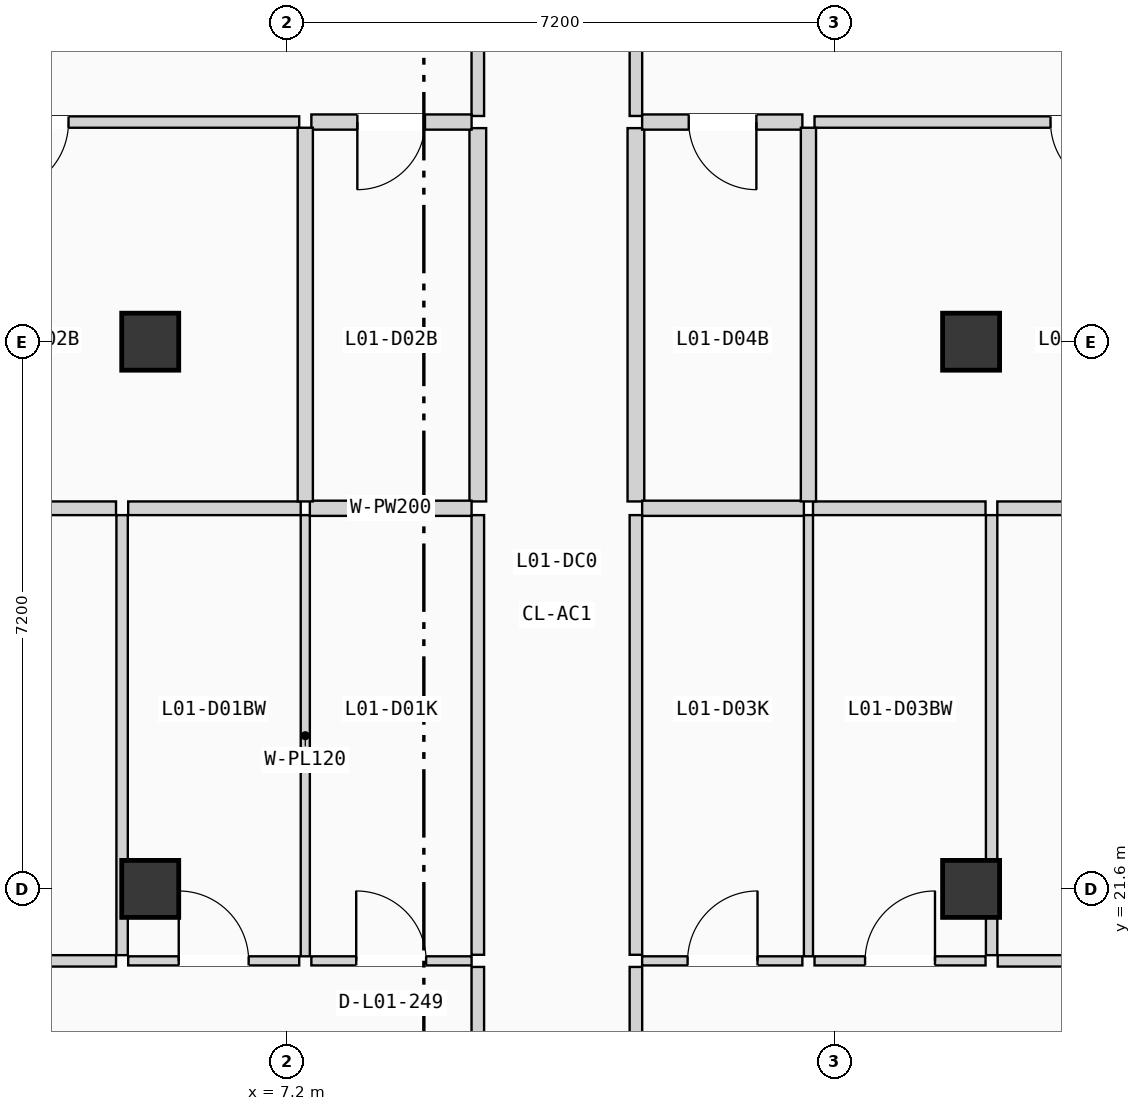
"""IFC4 building model, lengths in metres.
Left out: names, types, materials, properties, quantities, classifications, styles, units other than length and angle.
Written with IfcOpenShell. Run it as: python <this file> out.ifc"""

import sys

from ifc_helpers import new_model, si_unit, direction, frame, frame_2d, origin, origin_2d, place, context, subcontext, project, spatial, rectangle, extrude, element, fill, save


model = new_model("IFC4")
c1 = context("Model", 3, precision=1e-05, world=origin(), true_north=direction((0.0, 1.0)))
c2 = subcontext(c1, "Body", "Model", "MODEL_VIEW")
j1 = project(units=[si_unit("LENGTHUNIT", "METRE"), si_unit("PLANEANGLEUNIT", "RADIAN")], contexts=[c1])
p1 = place(None, origin())
s1 = spatial("IfcSite", under=j1, at=p1, CompositionType="ELEMENT")
p2 = place(p1, origin())
s2 = spatial("IfcBuilding", under=s1, at=p2, CompositionType="ELEMENT")
p3 = place(p2, frame((0.0, 0.0, 4.9)))
s3 = spatial("IfcBuildingStorey", under=s2, at=p3, CompositionType="ELEMENT", Elevation=4.9)
for number, where, z_axis, x_axis in (
    (1, (5.4, 21.6, 0.0), (0.0, 0.0, 1.0), (1.0, 0.0, 0.0)),
    (2, (5.4, 28.8, 0.0), (0.0, 0.0, 1.0), (1.0, 0.0, 0.0)),
    (3, (16.2, 21.6, 0.0), (0.0, 0.0, 1.0), (1.0, 0.0, 0.0)),
    (4, (16.2, 28.8, 0.0), (0.0, 0.0, 1.0), (1.0, 0.0, 0.0)),
):
    element("IfcColumn", number, at=place(p3, frame(where, z_axis=z_axis, x_axis=x_axis)), inside=s3, PredefinedType="COLUMN", context=c2, shape_type="SweptSolid", body=[
        extrude(rectangle(XDim=0.75, YDim=0.75, at=origin_2d()), origin(), (0.0, 0.0, 1.0), 3.675),
    ])
p4 = place(p3, frame((9.71, 13.545, 0.0), z_axis=(0.0, 0.0, 1.0), x_axis=(0.0, 1.0, 0.0)))
e5 = element("IfcWall", 5, at=p4, inside=s3, PredefinedType="PARTITIONING", context=c2, shape_type="SweptSolid", body=[
    extrude(rectangle(XDim=7.028, YDim=0.165, at=frame_2d((3.514, 0.0))), origin(), (0.0, 0.0, 1.0), 3.395),
])
p5 = place(p4, frame((3.009, 0.0, 0.0)))
e6 = element("IfcOpeningElement", 6, at=p5, cuts=e5, PredefinedType="OPENING", context=c2, shape_type="SweptSolid", body=[
    extrude(rectangle(XDim=1.01, YDim=2.11, at=frame_2d((0.505, 1.055))), frame((0.0, 0.093, 0.0), z_axis=(0.0, -1.0, 0.0), x_axis=(1.0, 0.0, 0.0)), (0.0, 0.0, 1.0), 0.185),
])
p6 = place(p3, frame((9.71, 20.733, 0.0), z_axis=(0.0, 0.0, 1.0), x_axis=(0.0, 1.0, 0.0)))
e7 = element("IfcWall", 7, at=p6, inside=s3, PredefinedType="PARTITIONING", context=c2, shape_type="SweptSolid", body=[
    extrude(rectangle(XDim=5.785, YDim=0.165, at=frame_2d((2.893, 0.0))), origin(), (0.0, 0.0, 1.0), 3.395),
])
p7 = place(p3, frame((9.71, 31.77, 0.0), z_axis=(0.0, 0.0, 1.0), x_axis=(0.0, 1.0, 0.0)))
e8 = element("IfcWall", 8, at=p7, inside=s3, PredefinedType="PARTITIONING", context=c2, shape_type="SweptSolid", body=[
    extrude(rectangle(XDim=5.958, YDim=0.165, at=frame_2d((2.979, 0.0))), origin(), (0.0, 0.0, 1.0), 3.395),
])
p8 = place(p7, frame((2.474, 0.0, 0.0)))
e9 = element("IfcOpeningElement", 9, at=p8, cuts=e8, PredefinedType="OPENING", context=c2, shape_type="SweptSolid", body=[
    extrude(rectangle(XDim=1.01, YDim=2.11, at=frame_2d((0.505, 1.055))), frame((0.0, 0.093, 0.0), z_axis=(0.0, -1.0, 0.0), x_axis=(1.0, 0.0, 0.0)), (0.0, 0.0, 1.0), 0.185),
])
p9 = place(p3, frame((9.71, 26.698, 0.0), z_axis=(0.0, 0.0, 1.0), x_axis=(0.0, 1.0, 0.0)))
e10 = element("IfcWall", 10, at=p9, inside=s3, PredefinedType="PLUMBINGWALL", context=c2, shape_type="SweptSolid", body=[
    extrude(rectangle(XDim=4.912, YDim=0.22, at=frame_2d((2.456, 0.0))), origin(), (0.0, 0.0, 1.0), 3.395),
])
p10 = place(p3, frame((11.79, 13.545, 0.0), z_axis=(0.0, 0.0, 1.0), x_axis=(0.0, 1.0, 0.0)))
e11 = element("IfcWall", 11, at=p10, inside=s3, PredefinedType="PARTITIONING", context=c2, shape_type="SweptSolid", body=[
    extrude(rectangle(XDim=7.028, YDim=0.165, at=frame_2d((3.514, 0.0))), origin(), (0.0, 0.0, 1.0), 3.395),
])
p11 = place(p10, frame((3.009, 0.0, 0.0)))
e12 = element("IfcOpeningElement", 12, at=p11, cuts=e11, PredefinedType="OPENING", context=c2, shape_type="SweptSolid", body=[
    extrude(rectangle(XDim=1.01, YDim=2.11, at=frame_2d((0.505, 1.055))), frame((0.0, 0.093, 0.0), z_axis=(0.0, -1.0, 0.0), x_axis=(1.0, 0.0, 0.0)), (0.0, 0.0, 1.0), 0.185),
])
p12 = place(p3, frame((11.79, 20.733, 0.0), z_axis=(0.0, 0.0, 1.0), x_axis=(0.0, 1.0, 0.0)))
e13 = element("IfcWall", 13, at=p12, inside=s3, PredefinedType="PARTITIONING", context=c2, shape_type="SweptSolid", body=[
    extrude(rectangle(XDim=5.785, YDim=0.165, at=frame_2d((2.893, 0.0))), origin(), (0.0, 0.0, 1.0), 3.395),
])
p13 = place(p3, frame((11.79, 31.77, 0.0), z_axis=(0.0, 0.0, 1.0), x_axis=(0.0, 1.0, 0.0)))
e14 = element("IfcWall", 14, at=p13, inside=s3, PredefinedType="PARTITIONING", context=c2, shape_type="SweptSolid", body=[
    extrude(rectangle(XDim=5.958, YDim=0.165, at=frame_2d((2.979, 0.0))), origin(), (0.0, 0.0, 1.0), 3.395),
])
p14 = place(p13, frame((2.474, 0.0, 0.0)))
e15 = element("IfcOpeningElement", 15, at=p14, cuts=e14, PredefinedType="OPENING", context=c2, shape_type="SweptSolid", body=[
    extrude(rectangle(XDim=1.01, YDim=2.11, at=frame_2d((0.505, 1.055))), frame((0.0, 0.093, 0.0), z_axis=(0.0, -1.0, 0.0), x_axis=(1.0, 0.0, 0.0)), (0.0, 0.0, 1.0), 0.185),
])
p15 = place(p3, frame((11.79, 26.698, 0.0), z_axis=(0.0, 0.0, 1.0), x_axis=(0.0, 1.0, 0.0)))
e16 = element("IfcWall", 16, at=p15, inside=s3, PredefinedType="PLUMBINGWALL", context=c2, shape_type="SweptSolid", body=[
    extrude(rectangle(XDim=4.912, YDim=0.22, at=frame_2d((2.456, 0.0))), origin(), (0.0, 0.0, 1.0), 3.395),
])
p16 = place(p3, frame((7.52, 20.653, 0.0), z_axis=(0.0, 0.0, 1.0), x_axis=(1.0, 0.0, 0.0)))
e17 = element("IfcWall", 17, at=p16, inside=s3, PredefinedType="PARTITIONING", context=c2, shape_type="SweptSolid", body=[
    extrude(rectangle(XDim=2.108, YDim=0.12, at=frame_2d((1.054, 0.0))), origin(), (0.0, 0.0, 1.0), 3.395),
])
p17 = place(p16, frame((0.59, 0.0, 0.0)))
e18 = element("IfcOpeningElement", 18, at=p17, cuts=e17, PredefinedType="OPENING", context=c2, shape_type="SweptSolid", body=[
    extrude(rectangle(XDim=0.92, YDim=2.02, at=frame_2d((0.46, 1.01))), frame((0.0, 0.07, 0.0), z_axis=(0.0, -1.0, 0.0), x_axis=(1.0, 0.0, 0.0)), (0.0, 0.0, 1.0), 0.14),
])
p18 = place(p3, frame((0.35, 20.653, 0.0), z_axis=(0.0, 0.0, 1.0), x_axis=(1.0, 0.0, 0.0)))
e19 = element("IfcWall", 19, at=p18, inside=s3, PredefinedType="PARTITIONING", context=c2, shape_type="SweptSolid", body=[
    extrude(rectangle(XDim=4.6, YDim=0.15, at=frame_2d((2.3, 0.0))), origin(), (0.0, 0.0, 1.0), 3.395),
])
p19 = place(p18, frame((1.76, 0.0, 0.0)))
e20 = element("IfcOpeningElement", 20, at=p19, cuts=e19, PredefinedType="OPENING", context=c2, shape_type="SweptSolid", body=[
    extrude(rectangle(XDim=1.08, YDim=2.1, at=frame_2d((0.54, 1.05))), frame((0.0, 0.085, 0.0), z_axis=(0.0, -1.0, 0.0), x_axis=(1.0, 0.0, 0.0)), (0.0, 0.0, 1.0), 0.17),
])
p20 = place(p3, frame((5.11, 20.653, 0.0), z_axis=(0.0, 0.0, 1.0), x_axis=(1.0, 0.0, 0.0)))
e21 = element("IfcWall", 21, at=p20, inside=s3, PredefinedType="PARTITIONING", context=c2, shape_type="SweptSolid", body=[
    extrude(rectangle(XDim=2.25, YDim=0.12, at=frame_2d((1.125, 0.0))), origin(), (0.0, 0.0, 1.0), 3.395),
])
p21 = place(p20, frame((0.665, 0.0, 0.0)))
e22 = element("IfcOpeningElement", 22, at=p21, cuts=e21, PredefinedType="OPENING", context=c2, shape_type="SweptSolid", body=[
    extrude(rectangle(XDim=0.92, YDim=2.02, at=frame_2d((0.46, 1.01))), frame((0.0, 0.07, 0.0), z_axis=(0.0, -1.0, 0.0), x_axis=(1.0, 0.0, 0.0)), (0.0, 0.0, 1.0), 0.14),
])
p22 = place(p3, frame((7.44, 20.713, 0.0), z_axis=(0.0, 0.0, 1.0), x_axis=(0.0, 1.0, 0.0)))
e23 = element("IfcWall", 23, at=p22, inside=s3, PredefinedType="PARTITIONING", context=c2, shape_type="SweptSolid", body=[
    extrude(rectangle(XDim=5.805, YDim=0.12, at=frame_2d((2.903, 0.0))), origin(), (0.0, 0.0, 1.0), 3.395),
])
p23 = place(p3, frame((7.5, 26.608, 0.0), z_axis=(0.0, 0.0, 1.0), x_axis=(1.0, 0.0, 0.0)))
e24 = element("IfcWall", 24, at=p23, inside=s3, PredefinedType="PLUMBINGWALL", context=c2, shape_type="SweptSolid", body=[
    extrude(rectangle(XDim=2.128, YDim=0.2, at=frame_2d((1.064, 0.0))), origin(), (0.0, 0.0, 1.0), 3.395),
])
p24 = place(p3, frame((5.03, 20.728, 0.0), z_axis=(0.0, 0.0, 1.0), x_axis=(0.0, 1.0, 0.0)))
e25 = element("IfcWall", 25, at=p24, inside=s3, PredefinedType="PARTITIONING", context=c2, shape_type="SweptSolid", body=[
    extrude(rectangle(XDim=5.79, YDim=0.15, at=frame_2d((2.895, 0.0))), origin(), (0.0, 0.0, 1.0), 3.395),
])
p25 = place(p3, frame((0.35, 26.608, 0.0), z_axis=(0.0, 0.0, 1.0), x_axis=(1.0, 0.0, 0.0)))
e26 = element("IfcWall", 26, at=p25, inside=s3, PredefinedType="PARTITIONING", context=c2, shape_type="SweptSolid", body=[
    extrude(rectangle(XDim=4.6, YDim=0.18, at=frame_2d((2.3, 0.0))), origin(), (0.0, 0.0, 1.0), 3.395),
])
p26 = place(p3, frame((5.11, 26.608, 0.0), z_axis=(0.0, 0.0, 1.0), x_axis=(1.0, 0.0, 0.0)))
e27 = element("IfcWall", 27, at=p26, inside=s3, PredefinedType="PARTITIONING", context=c2, shape_type="SweptSolid", body=[
    extrude(rectangle(XDim=2.27, YDim=0.18, at=frame_2d((1.135, 0.0))), origin(), (0.0, 0.0, 1.0), 3.395),
])
p27 = place(p3, frame((7.52, 31.69, 0.0), z_axis=(0.0, 0.0, 1.0), x_axis=(1.0, 0.0, 0.0)))
e28 = element("IfcWall", 28, at=p27, inside=s3, PredefinedType="PLUMBINGWALL", context=c2, shape_type="SweptSolid", body=[
    extrude(rectangle(XDim=2.108, YDim=0.2, at=frame_2d((1.054, 0.0))), origin(), (0.0, 0.0, 1.0), 3.395),
])
p28 = place(p27, frame((0.605, 0.0, 0.0)))
e29 = element("IfcOpeningElement", 29, at=p28, cuts=e28, PredefinedType="OPENING", context=c2, shape_type="SweptSolid", body=[
    extrude(rectangle(XDim=0.89, YDim=2.03, at=frame_2d((0.445, 1.015))), frame((0.0, 0.11, 0.0), z_axis=(0.0, -1.0, 0.0), x_axis=(1.0, 0.0, 0.0)), (0.0, 0.0, 1.0), 0.22),
])
p29 = place(p3, frame((0.35, 31.69, 0.0), z_axis=(0.0, 0.0, 1.0), x_axis=(1.0, 0.0, 0.0)))
e30 = element("IfcWall", 30, at=p29, inside=s3, PredefinedType="PARTITIONING", context=c2, shape_type="SweptSolid", body=[
    extrude(rectangle(XDim=7.01, YDim=0.15, at=frame_2d((3.505, 0.0))), origin(), (0.0, 0.0, 1.0), 3.395),
])
p30 = place(p29, frame((3.035, 0.0, 0.0)))
e31 = element("IfcOpeningElement", 31, at=p30, cuts=e30, PredefinedType="OPENING", context=c2, shape_type="SweptSolid", body=[
    extrude(rectangle(XDim=0.94, YDim=2.06, at=frame_2d((0.47, 1.03))), frame((0.0, 0.085, 0.0), z_axis=(0.0, -1.0, 0.0), x_axis=(1.0, 0.0, 0.0)), (0.0, 0.0, 1.0), 0.17),
])
p31 = place(p3, frame((7.44, 26.698, 0.0), z_axis=(0.0, 0.0, 1.0), x_axis=(0.0, 1.0, 0.0)))
e32 = element("IfcWall", 32, at=p31, inside=s3, PredefinedType="PLUMBINGWALL", context=c2, shape_type="SweptSolid", body=[
    extrude(rectangle(XDim=4.917, YDim=0.2, at=frame_2d((2.458, 0.0))), origin(), (0.0, 0.0, 1.0), 3.395),
])
p32 = place(p3, frame((11.872, 20.653, 0.0), z_axis=(0.0, 0.0, 1.0), x_axis=(1.0, 0.0, 0.0)))
e33 = element("IfcWall", 33, at=p32, inside=s3, PredefinedType="PARTITIONING", context=c2, shape_type="SweptSolid", body=[
    extrude(rectangle(XDim=2.108, YDim=0.12, at=frame_2d((1.054, 0.0))), origin(), (0.0, 0.0, 1.0), 3.395),
])
p33 = place(p32, frame((0.598, 0.0, 0.0)))
e34 = element("IfcOpeningElement", 34, at=p33, cuts=e33, PredefinedType="OPENING", context=c2, shape_type="SweptSolid", body=[
    extrude(rectangle(XDim=0.92, YDim=2.02, at=frame_2d((0.46, 1.01))), frame((0.0, 0.07, 0.0), z_axis=(0.0, -1.0, 0.0), x_axis=(1.0, 0.0, 0.0)), (0.0, 0.0, 1.0), 0.14),
])
p34 = place(p3, frame((16.55, 20.653, 0.0), z_axis=(0.0, 0.0, 1.0), x_axis=(1.0, 0.0, 0.0)))
e35 = element("IfcWall", 35, at=p34, inside=s3, PredefinedType="PARTITIONING", context=c2, shape_type="SweptSolid", body=[
    extrude(rectangle(XDim=4.7, YDim=0.15, at=frame_2d((2.35, 0.0))), origin(), (0.0, 0.0, 1.0), 3.395),
])
p35 = place(p34, frame((1.83, 0.0, 0.0)))
e36 = element("IfcOpeningElement", 36, at=p35, cuts=e35, PredefinedType="OPENING", context=c2, shape_type="SweptSolid", body=[
    extrude(rectangle(XDim=1.04, YDim=2.08, at=frame_2d((0.52, 1.04))), frame((0.0, 0.085, 0.0), z_axis=(0.0, -1.0, 0.0), x_axis=(1.0, 0.0, 0.0)), (0.0, 0.0, 1.0), 0.17),
])
p36 = place(p3, frame((14.14, 20.653, 0.0), z_axis=(0.0, 0.0, 1.0), x_axis=(1.0, 0.0, 0.0)))
e37 = element("IfcWall", 37, at=p36, inside=s3, PredefinedType="PARTITIONING", context=c2, shape_type="SweptSolid", body=[
    extrude(rectangle(XDim=2.25, YDim=0.12, at=frame_2d((1.125, 0.0))), origin(), (0.0, 0.0, 1.0), 3.395),
])
p37 = place(p36, frame((0.665, 0.0, 0.0)))
e38 = element("IfcOpeningElement", 38, at=p37, cuts=e37, PredefinedType="OPENING", context=c2, shape_type="SweptSolid", body=[
    extrude(rectangle(XDim=0.92, YDim=2.02, at=frame_2d((0.46, 1.01))), frame((0.0, 0.07, 0.0), z_axis=(0.0, -1.0, 0.0), x_axis=(1.0, 0.0, 0.0)), (0.0, 0.0, 1.0), 0.14),
])
p38 = place(p3, frame((14.06, 20.713, 0.0), z_axis=(0.0, 0.0, 1.0), x_axis=(0.0, 1.0, 0.0)))
e39 = element("IfcWall", 39, at=p38, inside=s3, PredefinedType="PARTITIONING", context=c2, shape_type="SweptSolid", body=[
    extrude(rectangle(XDim=5.805, YDim=0.12, at=frame_2d((2.903, 0.0))), origin(), (0.0, 0.0, 1.0), 3.395),
])
p39 = place(p3, frame((11.872, 26.608, 0.0), z_axis=(0.0, 0.0, 1.0), x_axis=(1.0, 0.0, 0.0)))
e40 = element("IfcWall", 40, at=p39, inside=s3, PredefinedType="PLUMBINGWALL", context=c2, shape_type="SweptSolid", body=[
    extrude(rectangle(XDim=2.128, YDim=0.2, at=frame_2d((1.064, 0.0))), origin(), (0.0, 0.0, 1.0), 3.395),
])
p40 = place(p3, frame((16.47, 20.728, 0.0), z_axis=(0.0, 0.0, 1.0), x_axis=(0.0, 1.0, 0.0)))
e41 = element("IfcWall", 41, at=p40, inside=s3, PredefinedType="PARTITIONING", context=c2, shape_type="SweptSolid", body=[
    extrude(rectangle(XDim=5.79, YDim=0.15, at=frame_2d((2.895, 0.0))), origin(), (0.0, 0.0, 1.0), 3.395),
])
p41 = place(p3, frame((16.545, 26.608, 0.0), z_axis=(0.0, 0.0, 1.0), x_axis=(1.0, 0.0, 0.0)))
e42 = element("IfcWall", 42, at=p41, inside=s3, PredefinedType="PARTITIONING", context=c2, shape_type="SweptSolid", body=[
    extrude(rectangle(XDim=4.705, YDim=0.18, at=frame_2d((2.353, 0.0))), origin(), (0.0, 0.0, 1.0), 3.395),
])
p42 = place(p3, frame((14.12, 26.608, 0.0), z_axis=(0.0, 0.0, 1.0), x_axis=(1.0, 0.0, 0.0)))
e43 = element("IfcWall", 43, at=p42, inside=s3, PredefinedType="PARTITIONING", context=c2, shape_type="SweptSolid", body=[
    extrude(rectangle(XDim=2.27, YDim=0.18, at=frame_2d((1.135, 0.0))), origin(), (0.0, 0.0, 1.0), 3.395),
])
p43 = place(p3, frame((11.872, 31.69, 0.0), z_axis=(0.0, 0.0, 1.0), x_axis=(1.0, 0.0, 0.0)))
e44 = element("IfcWall", 44, at=p43, inside=s3, PredefinedType="PLUMBINGWALL", context=c2, shape_type="SweptSolid", body=[
    extrude(rectangle(XDim=2.108, YDim=0.2, at=frame_2d((1.054, 0.0))), origin(), (0.0, 0.0, 1.0), 3.395),
])
p44 = place(p43, frame((0.613, 0.0, 0.0)))
e45 = element("IfcOpeningElement", 45, at=p44, cuts=e44, PredefinedType="OPENING", context=c2, shape_type="SweptSolid", body=[
    extrude(rectangle(XDim=0.89, YDim=2.03, at=frame_2d((0.445, 1.015))), frame((0.0, 0.11, 0.0), z_axis=(0.0, -1.0, 0.0), x_axis=(1.0, 0.0, 0.0)), (0.0, 0.0, 1.0), 0.22),
])
p45 = place(p3, frame((14.14, 31.69, 0.0), z_axis=(0.0, 0.0, 1.0), x_axis=(1.0, 0.0, 0.0)))
e46 = element("IfcWall", 46, at=p45, inside=s3, PredefinedType="PARTITIONING", context=c2, shape_type="SweptSolid", body=[
    extrude(rectangle(XDim=7.11, YDim=0.15, at=frame_2d((3.555, 0.0))), origin(), (0.0, 0.0, 1.0), 3.395),
])
p46 = place(p45, frame((3.105, 0.0, 0.0)))
e47 = element("IfcOpeningElement", 47, at=p46, cuts=e46, PredefinedType="OPENING", context=c2, shape_type="SweptSolid", body=[
    extrude(rectangle(XDim=0.9, YDim=2.04, at=frame_2d((0.45, 1.02))), frame((0.0, 0.085, 0.0), z_axis=(0.0, -1.0, 0.0), x_axis=(1.0, 0.0, 0.0)), (0.0, 0.0, 1.0), 0.17),
])
p47 = place(p3, frame((14.06, 26.698, 0.0), z_axis=(0.0, 0.0, 1.0), x_axis=(0.0, 1.0, 0.0)))
e48 = element("IfcWall", 48, at=p47, inside=s3, PredefinedType="PLUMBINGWALL", context=c2, shape_type="SweptSolid", body=[
    extrude(rectangle(XDim=4.917, YDim=0.2, at=frame_2d((2.458, 0.0))), origin(), (0.0, 0.0, 1.0), 3.395),
])
p48 = place(p17, origin())
e49 = element("IfcDoor", 49, at=p48, inside=s3, OperationType="SINGLE_SWING_LEFT", PredefinedType="DOOR", context=c2, shape_type="SweptSolid", body=[
    extrude(rectangle(XDim=0.92, YDim=2.02, at=frame_2d((0.46, 1.01))), frame((0.0, 0.025, 0.0), z_axis=(0.0, -1.0, 0.0), x_axis=(1.0, 0.0, 0.0)), (0.0, 0.0, 1.0), 0.05),
])
fill(e18, e49)
p49 = place(p21, origin())
e50 = element("IfcDoor", 50, at=p49, inside=s3, OperationType="SINGLE_SWING_LEFT", PredefinedType="DOOR", context=c2, shape_type="SweptSolid", body=[
    extrude(rectangle(XDim=0.92, YDim=2.02, at=frame_2d((0.46, 1.01))), frame((0.0, 0.025, 0.0), z_axis=(0.0, -1.0, 0.0), x_axis=(1.0, 0.0, 0.0)), (0.0, 0.0, 1.0), 0.05),
])
fill(e22, e50)
p50 = place(p28, frame((0.89, 0.0, 0.0), z_axis=(0.0, 0.0, 1.0), x_axis=(-1.0, 0.0, 0.0)))
e51 = element("IfcDoor", 51, at=p50, inside=s3, OperationType="SINGLE_SWING_LEFT", PredefinedType="DOOR", context=c2, shape_type="SweptSolid", body=[
    extrude(rectangle(XDim=0.89, YDim=2.03, at=frame_2d((0.445, 1.015))), frame((0.0, 0.025, 0.0), z_axis=(0.0, -1.0, 0.0), x_axis=(1.0, 0.0, 0.0)), (0.0, 0.0, 1.0), 0.05),
])
fill(e29, e51)
p51 = place(p30, frame((0.94, 0.0, 0.0), z_axis=(0.0, 0.0, 1.0), x_axis=(-1.0, 0.0, 0.0)))
e52 = element("IfcDoor", 52, at=p51, inside=s3, OperationType="SINGLE_SWING_LEFT", PredefinedType="DOOR", context=c2, shape_type="SweptSolid", body=[
    extrude(rectangle(XDim=0.94, YDim=2.06, at=frame_2d((0.47, 1.03))), frame((0.0, 0.025, 0.0), z_axis=(0.0, -1.0, 0.0), x_axis=(1.0, 0.0, 0.0)), (0.0, 0.0, 1.0), 0.05),
])
fill(e31, e52)
p52 = place(p33, origin())
e53 = element("IfcDoor", 53, at=p52, inside=s3, OperationType="SINGLE_SWING_RIGHT", PredefinedType="DOOR", context=c2, shape_type="SweptSolid", body=[
    extrude(rectangle(XDim=0.92, YDim=2.02, at=frame_2d((0.46, 1.01))), frame((0.0, 0.025, 0.0), z_axis=(0.0, -1.0, 0.0), x_axis=(1.0, 0.0, 0.0)), (0.0, 0.0, 1.0), 0.05),
])
fill(e34, e53)
p53 = place(p37, origin())
e54 = element("IfcDoor", 54, at=p53, inside=s3, OperationType="SINGLE_SWING_RIGHT", PredefinedType="DOOR", context=c2, shape_type="SweptSolid", body=[
    extrude(rectangle(XDim=0.92, YDim=2.02, at=frame_2d((0.46, 1.01))), frame((0.0, 0.025, 0.0), z_axis=(0.0, -1.0, 0.0), x_axis=(1.0, 0.0, 0.0)), (0.0, 0.0, 1.0), 0.05),
])
fill(e38, e54)
p54 = place(p44, frame((0.89, 0.0, 0.0), z_axis=(0.0, 0.0, 1.0), x_axis=(-1.0, 0.0, 0.0)))
e55 = element("IfcDoor", 55, at=p54, inside=s3, OperationType="SINGLE_SWING_RIGHT", PredefinedType="DOOR", context=c2, shape_type="SweptSolid", body=[
    extrude(rectangle(XDim=0.89, YDim=2.03, at=frame_2d((0.445, 1.015))), frame((0.0, 0.025, 0.0), z_axis=(0.0, -1.0, 0.0), x_axis=(1.0, 0.0, 0.0)), (0.0, 0.0, 1.0), 0.05),
])
fill(e45, e55)
p55 = place(p46, frame((0.9, 0.0, 0.0), z_axis=(0.0, 0.0, 1.0), x_axis=(-1.0, 0.0, 0.0)))
e56 = element("IfcDoor", 56, at=p55, inside=s3, OperationType="SINGLE_SWING_RIGHT", PredefinedType="DOOR", context=c2, shape_type="SweptSolid", body=[
    extrude(rectangle(XDim=0.9, YDim=2.04, at=frame_2d((0.45, 1.02))), frame((0.0, 0.025, 0.0), z_axis=(0.0, -1.0, 0.0), x_axis=(1.0, 0.0, 0.0)), (0.0, 0.0, 1.0), 0.05),
])
fill(e47, e56)
save(model, sys.argv[1])
